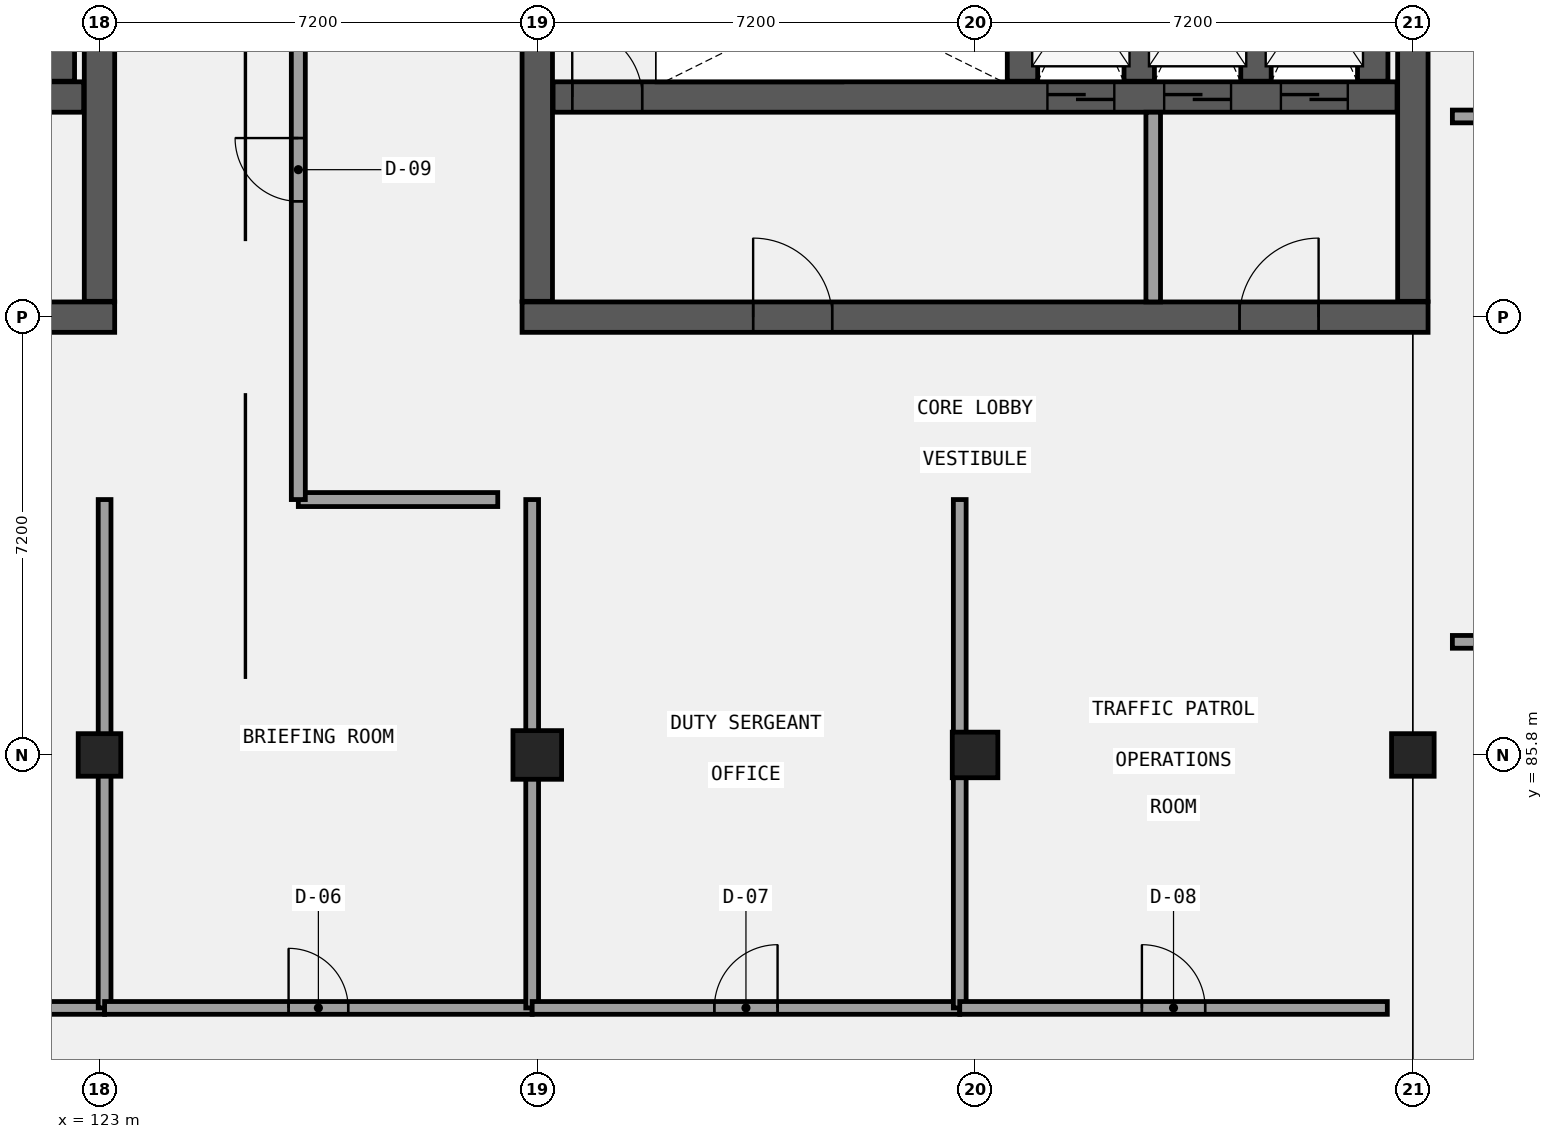
"""IFC4 building model, lengths in metres.
Left out: names, types, materials, properties, quantities, classifications, styles, units other than length and angle.
Written with IfcOpenShell. Run it as: python <this file> out.ifc"""

import sys

from ifc_helpers import new_model, si_unit, direction, frame, frame_2d, origin, origin_2d, place, context, subcontext, project, spatial, rectangle, extrude, element, fill, save


model = new_model("IFC4")
c1 = context("Model", 3, precision=1e-05, world=origin(), true_north=direction((0.0, 1.0)))
c2 = subcontext(c1, "Body", "Model", "MODEL_VIEW")
j1 = project(units=[si_unit("LENGTHUNIT", "METRE"), si_unit("PLANEANGLEUNIT", "RADIAN")], contexts=[c1])
p1 = place(None, origin())
s1 = spatial("IfcSite", under=j1, at=p1, CompositionType="ELEMENT")
p2 = place(p1, origin())
s2 = spatial("IfcBuilding", under=s1, at=p2, CompositionType="ELEMENT")
p3 = place(p2, frame((0.0, 0.0, 5.4)))
s3 = spatial("IfcBuildingStorey", under=s2, at=p3, CompositionType="ELEMENT", Elevation=5.4)
p4 = place(p3, frame((108.35, 93.0, 0.0), z_axis=(0.0, 0.0, 1.0), x_axis=(1.0, 0.0, 0.0)))
e1 = element("IfcWall", 1, at=p4, inside=s3, PredefinedType="SHEAR", context=c2, shape_type="SweptSolid", body=[
    extrude(rectangle(XDim=14.9, YDim=0.5, at=frame_2d((7.45, 0.0))), origin(), (0.0, 0.0, 1.0), 4.2),
])
p5 = place(p4, frame((3.8, 0.0, 0.0)))
e2 = element("IfcOpeningElement", 2, at=p5, cuts=e1, PredefinedType="OPENING", context=c2, shape_type="SweptSolid", body=[
    extrude(rectangle(XDim=1.3, YDim=2.2, at=frame_2d((0.65, 1.1))), frame((0.0, 0.26, 0.0), z_axis=(0.0, -1.0, 0.0), x_axis=(1.0, 0.0, 0.0)), (0.0, 0.0, 1.0), 0.52),
])
p6 = place(p4, frame((11.8, 0.0, 0.0)))
e3 = element("IfcOpeningElement", 3, at=p6, cuts=e1, PredefinedType="OPENING", context=c2, shape_type="SweptSolid", body=[
    extrude(rectangle(XDim=1.3, YDim=2.2, at=frame_2d((0.65, 1.1))), frame((0.0, 0.26, 0.0), z_axis=(0.0, -1.0, 0.0), x_axis=(1.0, 0.0, 0.0)), (0.0, 0.0, 1.0), 0.52),
])
p7 = place(p3, frame((123.0, 93.26, 0.0), z_axis=(0.0, 0.0, 1.0), x_axis=(0.0, 1.0, 0.0)))
e4 = element("IfcWall", 4, at=p7, inside=s3, PredefinedType="SHEAR", context=c2, shape_type="SweptSolid", body=[
    extrude(rectangle(XDim=6.68, YDim=0.5, at=frame_2d((3.34, 0.0))), origin(), (0.0, 0.0, 1.0), 4.2),
])
p8 = place(p3, frame((108.86, 96.62, 0.0), z_axis=(0.0, 0.0, 1.0), x_axis=(1.0, 0.0, 0.0)))
e5 = element("IfcWall", 5, at=p8, inside=s3, PredefinedType="SHEAR", context=c2, shape_type="SweptSolid", body=[
    extrude(rectangle(XDim=13.88, YDim=0.5, at=frame_2d((6.94, 0.0))), origin(), (0.0, 0.0, 1.0), 4.2),
])
p9 = place(p8, frame((8.13, 0.0, 0.0)))
e6 = element("IfcOpeningElement", 6, at=p9, cuts=e5, PredefinedType="OPENING", context=c2, shape_type="SweptSolid", body=[
    extrude(rectangle(XDim=1.1, YDim=2.15, at=frame_2d((0.55, 1.075))), frame((0.0, 0.26, 0.0), z_axis=(0.0, -1.0, 0.0), x_axis=(1.0, 0.0, 0.0)), (0.0, 0.0, 1.0), 0.52),
])
p10 = place(p8, frame((10.05, 0.0, 0.0)))
e7 = element("IfcOpeningElement", 7, at=p10, cuts=e5, PredefinedType="OPENING", context=c2, shape_type="SweptSolid", body=[
    extrude(rectangle(XDim=1.1, YDim=2.15, at=frame_2d((0.55, 1.075))), frame((0.0, 0.26, 0.0), z_axis=(0.0, -1.0, 0.0), x_axis=(1.0, 0.0, 0.0)), (0.0, 0.0, 1.0), 0.52),
])
p11 = place(p8, frame((11.97, 0.0, 0.0)))
e8 = element("IfcOpeningElement", 8, at=p11, cuts=e5, PredefinedType="OPENING", context=c2, shape_type="SweptSolid", body=[
    extrude(rectangle(XDim=1.1, YDim=2.15, at=frame_2d((0.55, 1.075))), frame((0.0, 0.26, 0.0), z_axis=(0.0, -1.0, 0.0), x_axis=(1.0, 0.0, 0.0)), (0.0, 0.0, 1.0), 0.52),
])
p12 = place(p8, frame((0.315, 0.0, 0.0)))
e9 = element("IfcOpeningElement", 9, at=p12, cuts=e5, PredefinedType="OPENING", context=c2, shape_type="SweptSolid", body=[
    extrude(rectangle(XDim=1.15, YDim=2.15, at=frame_2d((0.575, 1.075))), frame((0.0, 0.26, 0.0), z_axis=(0.0, -1.0, 0.0), x_axis=(1.0, 0.0, 0.0)), (0.0, 0.0, 1.0), 0.52),
])
p13 = place(p3, frame((122.34, 96.88, 0.0), z_axis=(0.0, 0.0, 1.0), x_axis=(0.0, 1.0, 0.0)))
e10 = element("IfcWall", 10, at=p13, inside=s3, PredefinedType="SHEAR", context=c2, shape_type="SweptSolid", body=[
    extrude(rectangle(XDim=3.06, YDim=0.5, at=frame_2d((1.53, 0.0))), origin(), (0.0, 0.0, 1.0), 4.2),
])
p14 = place(p3, frame((129.95, 93.0, 0.0), z_axis=(0.0, 0.0, 1.0), x_axis=(1.0, 0.0, 0.0)))
e11 = element("IfcWall", 11, at=p14, inside=s3, PredefinedType="SHEAR", context=c2, shape_type="SweptSolid", body=[
    extrude(rectangle(XDim=14.9, YDim=0.5, at=frame_2d((7.45, 0.0))), origin(), (0.0, 0.0, 1.0), 4.2),
])
p15 = place(p14, frame((3.8, 0.0, 0.0)))
e12 = element("IfcOpeningElement", 12, at=p15, cuts=e11, PredefinedType="OPENING", context=c2, shape_type="SweptSolid", body=[
    extrude(rectangle(XDim=1.3, YDim=2.2, at=frame_2d((0.65, 1.1))), frame((0.0, 0.26, 0.0), z_axis=(0.0, -1.0, 0.0), x_axis=(1.0, 0.0, 0.0)), (0.0, 0.0, 1.0), 0.52),
])
p16 = place(p14, frame((11.8, 0.0, 0.0)))
e13 = element("IfcOpeningElement", 13, at=p16, cuts=e11, PredefinedType="OPENING", context=c2, shape_type="SweptSolid", body=[
    extrude(rectangle(XDim=1.3, YDim=2.2, at=frame_2d((0.65, 1.1))), frame((0.0, 0.26, 0.0), z_axis=(0.0, -1.0, 0.0), x_axis=(1.0, 0.0, 0.0)), (0.0, 0.0, 1.0), 0.52),
])
for number, where, z_axis, x_axis in (
    (14, (130.2, 93.26, 0.0), (0.0, 0.0, 1.0), (0.0, 1.0, 0.0)),
    (15, (144.6, 93.26, 0.0), (0.0, 0.0, 1.0), (0.0, 1.0, 0.0)),
):
    element("IfcWall", number, at=place(p3, frame(where, z_axis=z_axis, x_axis=x_axis)), inside=s3, PredefinedType="SHEAR", context=c2, shape_type="SweptSolid", body=[
        extrude(rectangle(XDim=6.68, YDim=0.5, at=frame_2d((3.34, 0.0))), origin(), (0.0, 0.0, 1.0), 4.2),
    ])
p17 = place(p3, frame((130.46, 96.62, 0.0), z_axis=(0.0, 0.0, 1.0), x_axis=(1.0, 0.0, 0.0)))
e16 = element("IfcWall", 16, at=p17, inside=s3, PredefinedType="SHEAR", context=c2, shape_type="SweptSolid", body=[
    extrude(rectangle(XDim=13.88, YDim=0.5, at=frame_2d((6.94, 0.0))), origin(), (0.0, 0.0, 1.0), 4.2),
])
p18 = place(p17, frame((8.13, 0.0, 0.0)))
e17 = element("IfcOpeningElement", 17, at=p18, cuts=e16, PredefinedType="OPENING", context=c2, shape_type="SweptSolid", body=[
    extrude(rectangle(XDim=1.1, YDim=2.15, at=frame_2d((0.55, 1.075))), frame((0.0, 0.26, 0.0), z_axis=(0.0, -1.0, 0.0), x_axis=(1.0, 0.0, 0.0)), (0.0, 0.0, 1.0), 0.52),
])
p19 = place(p17, frame((10.05, 0.0, 0.0)))
e18 = element("IfcOpeningElement", 18, at=p19, cuts=e16, PredefinedType="OPENING", context=c2, shape_type="SweptSolid", body=[
    extrude(rectangle(XDim=1.1, YDim=2.15, at=frame_2d((0.55, 1.075))), frame((0.0, 0.26, 0.0), z_axis=(0.0, -1.0, 0.0), x_axis=(1.0, 0.0, 0.0)), (0.0, 0.0, 1.0), 0.52),
])
p20 = place(p17, frame((11.97, 0.0, 0.0)))
e19 = element("IfcOpeningElement", 19, at=p20, cuts=e16, PredefinedType="OPENING", context=c2, shape_type="SweptSolid", body=[
    extrude(rectangle(XDim=1.1, YDim=2.15, at=frame_2d((0.55, 1.075))), frame((0.0, 0.26, 0.0), z_axis=(0.0, -1.0, 0.0), x_axis=(1.0, 0.0, 0.0)), (0.0, 0.0, 1.0), 0.52),
])
p21 = place(p17, frame((0.315, 0.0, 0.0)))
e20 = element("IfcOpeningElement", 20, at=p21, cuts=e16, PredefinedType="OPENING", context=c2, shape_type="SweptSolid", body=[
    extrude(rectangle(XDim=1.15, YDim=2.15, at=frame_2d((0.575, 1.075))), frame((0.0, 0.26, 0.0), z_axis=(0.0, -1.0, 0.0), x_axis=(1.0, 0.0, 0.0)), (0.0, 0.0, 1.0), 0.52),
])
for number, where, z_axis, x_axis in (
    (21, (138.18, 96.88, 0.0), (0.0, 0.0, 1.0), (0.0, 1.0, 0.0)),
    (22, (140.1, 96.88, 0.0), (0.0, 0.0, 1.0), (0.0, 1.0, 0.0)),
    (23, (142.02, 96.88, 0.0), (0.0, 0.0, 1.0), (0.0, 1.0, 0.0)),
    (24, (143.94, 96.88, 0.0), (0.0, 0.0, 1.0), (0.0, 1.0, 0.0)),
):
    element("IfcWall", number, at=place(p3, frame(where, z_axis=z_axis, x_axis=x_axis)), inside=s3, PredefinedType="SHEAR", context=c2, shape_type="SweptSolid", body=[
        extrude(rectangle(XDim=3.06, YDim=0.5, at=frame_2d((1.53, 0.0))), origin(), (0.0, 0.0, 1.0), 4.2),
    ])
p22 = place(p3, frame((123.0, 85.8, 0.0), z_axis=(0.0, 0.0, 1.0), x_axis=(1.0, 0.0, 0.0)))
e25 = element("IfcColumn", 25, at=p22, inside=s3, PredefinedType="COLUMN", context=c2, shape_type="SweptSolid", body=[
    extrude(rectangle(XDim=0.7, YDim=0.7, at=origin_2d()), origin(), (0.0, 0.0, 1.0), 4.2),
])
p23 = place(p3, frame((130.2, 85.8, 0.0), z_axis=(0.0, 0.0, 1.0), x_axis=(1.0, 0.0, 0.0)))
e26 = element("IfcColumn", 26, at=p23, inside=s3, PredefinedType="COLUMN", context=c2, shape_type="SweptSolid", body=[
    extrude(rectangle(XDim=0.8, YDim=0.8, at=origin_2d()), origin(), (0.0, 0.0, 1.0), 4.2),
])
p24 = place(p3, frame((137.4, 85.8, 0.0), z_axis=(0.0, 0.0, 1.0), x_axis=(1.0, 0.0, 0.0)))
e27 = element("IfcColumn", 27, at=p24, inside=s3, PredefinedType="COLUMN", context=c2, shape_type="SweptSolid", body=[
    extrude(rectangle(XDim=0.75, YDim=0.75, at=origin_2d()), origin(), (0.0, 0.0, 1.0), 4.2),
])
p25 = place(p3, frame((144.6, 85.8, 0.0), z_axis=(0.0, 0.0, 1.0), x_axis=(1.0, 0.0, 0.0)))
e28 = element("IfcColumn", 28, at=p25, inside=s3, PredefinedType="COLUMN", context=c2, shape_type="SweptSolid", body=[
    extrude(rectangle(XDim=0.7, YDim=0.7, at=origin_2d()), origin(), (0.0, 0.0, 1.0), 4.2),
])
p26 = place(p3, frame((140.33, 93.25, 0.0), z_axis=(0.0, 0.0, 1.0), x_axis=(0.0, 1.0, 0.0)))
e29 = element("IfcWall", 29, at=p26, inside=s3, PredefinedType="SOLIDWALL", context=c2, shape_type="SweptSolid", body=[
    extrude(rectangle(XDim=3.12, YDim=0.24, at=frame_2d((1.56, 0.0))), origin(), (0.0, 0.0, 1.0), 3.89),
])
p27 = place(p3, frame((116.052, 81.64, 0.0), z_axis=(0.0, 0.0, 1.0), x_axis=(1.0, 0.0, 0.0)))
e30 = element("IfcWall", 30, at=p27, inside=s3, PredefinedType="PARTITIONING", context=c2, shape_type="SweptSolid", body=[
    extrude(rectangle(XDim=7.032, YDim=0.21, at=frame_2d((3.516, 0.0))), origin(), (0.0, 0.0, 1.0), 3.92),
])
p28 = place(p27, frame((3.026, 0.0, 0.0)))
e31 = element("IfcOpeningElement", 31, at=p28, cuts=e30, PredefinedType="OPENING", context=c2, shape_type="SweptSolid", body=[
    extrude(rectangle(XDim=0.98, YDim=2.22, at=frame_2d((0.49, 1.11))), frame((0.0, 0.115, 0.0), z_axis=(0.0, -1.0, 0.0), x_axis=(1.0, 0.0, 0.0)), (0.0, 0.0, 1.0), 0.23),
])
p29 = place(p3, frame((123.084, 81.64, 0.0), z_axis=(0.0, 0.0, 1.0), x_axis=(0.0, 1.0, 0.0)))
e32 = element("IfcWall", 32, at=p29, inside=s3, PredefinedType="PARTITIONING", context=c2, shape_type="SweptSolid", body=[
    extrude(rectangle(XDim=8.36, YDim=0.21, at=frame_2d((4.18, 0.0))), origin(), (0.0, 0.0, 1.0), 2.92),
])
p30 = place(p3, frame((123.084, 81.64, 0.0), z_axis=(0.0, 0.0, 1.0), x_axis=(1.0, 0.0, 0.0)))
e33 = element("IfcWall", 33, at=p30, inside=s3, PredefinedType="PARTITIONING", context=c2, shape_type="SweptSolid", body=[
    extrude(rectangle(XDim=7.032, YDim=0.21, at=frame_2d((3.516, 0.0))), origin(), (0.0, 0.0, 1.0), 3.92),
])
p31 = place(p30, frame((3.026, 0.0, 0.0)))
e34 = element("IfcOpeningElement", 34, at=p31, cuts=e33, PredefinedType="OPENING", context=c2, shape_type="SweptSolid", body=[
    extrude(rectangle(XDim=0.98, YDim=2.35, at=frame_2d((0.49, 1.175))), frame((0.0, 0.115, 0.0), z_axis=(0.0, -1.0, 0.0), x_axis=(1.0, 0.0, 0.0)), (0.0, 0.0, 1.0), 0.23),
])
p32 = place(p3, frame((130.116, 81.64, 0.0), z_axis=(0.0, 0.0, 1.0), x_axis=(0.0, 1.0, 0.0)))
e35 = element("IfcWall", 35, at=p32, inside=s3, PredefinedType="PARTITIONING", context=c2, shape_type="SweptSolid", body=[
    extrude(rectangle(XDim=8.36, YDim=0.21, at=frame_2d((4.18, 0.0))), origin(), (0.0, 0.0, 1.0), 2.92),
])
p33 = place(p3, frame((130.116, 81.64, 0.0), z_axis=(0.0, 0.0, 1.0), x_axis=(1.0, 0.0, 0.0)))
e36 = element("IfcWall", 36, at=p33, inside=s3, PredefinedType="PARTITIONING", context=c2, shape_type="SweptSolid", body=[
    extrude(rectangle(XDim=7.032, YDim=0.21, at=frame_2d((3.516, 0.0))), origin(), (0.0, 0.0, 1.0), 3.92),
])
p34 = place(p33, frame((2.996, 0.0, 0.0)))
e37 = element("IfcOpeningElement", 37, at=p34, cuts=e36, PredefinedType="OPENING", context=c2, shape_type="SweptSolid", body=[
    extrude(rectangle(XDim=1.04, YDim=2.1, at=frame_2d((0.52, 1.05))), frame((0.0, 0.115, 0.0), z_axis=(0.0, -1.0, 0.0), x_axis=(1.0, 0.0, 0.0)), (0.0, 0.0, 1.0), 0.23),
])
p35 = place(p3, frame((137.148, 81.64, 0.0), z_axis=(0.0, 0.0, 1.0), x_axis=(0.0, 1.0, 0.0)))
e38 = element("IfcWall", 38, at=p35, inside=s3, PredefinedType="PARTITIONING", context=c2, shape_type="SweptSolid", body=[
    extrude(rectangle(XDim=8.36, YDim=0.21, at=frame_2d((4.18, 0.0))), origin(), (0.0, 0.0, 1.0), 3.32),
])
p36 = place(p3, frame((137.148, 81.64, 0.0), z_axis=(0.0, 0.0, 1.0), x_axis=(1.0, 0.0, 0.0)))
e39 = element("IfcWall", 39, at=p36, inside=s3, PredefinedType="PARTITIONING", context=c2, shape_type="SweptSolid", body=[
    extrude(rectangle(XDim=7.032, YDim=0.21, at=frame_2d((3.516, 0.0))), origin(), (0.0, 0.0, 1.0), 3.92),
])
p37 = place(p36, frame((2.996, 0.0, 0.0)))
e40 = element("IfcOpeningElement", 40, at=p37, cuts=e39, PredefinedType="OPENING", context=c2, shape_type="SweptSolid", body=[
    extrude(rectangle(XDim=1.04, YDim=2.22, at=frame_2d((0.52, 1.11))), frame((0.0, 0.115, 0.0), z_axis=(0.0, -1.0, 0.0), x_axis=(1.0, 0.0, 0.0)), (0.0, 0.0, 1.0), 0.23),
])
p38 = place(p3, frame((126.27, 90.0, 0.0), z_axis=(0.0, 0.0, 1.0), x_axis=(1.0, 0.0, 0.0)))
e41 = element("IfcWall", 41, at=p38, inside=s3, PredefinedType="PARTITIONING", context=c2, shape_type="SweptSolid", body=[
    extrude(rectangle(XDim=3.28, YDim=0.23, at=frame_2d((1.64, 0.0))), origin(), (0.0, 0.0, 1.0), 3.92),
])
p39 = place(p3, frame((126.27, 90.0, 0.0), z_axis=(0.0, 0.0, 1.0), x_axis=(0.0, 1.0, 0.0)))
e42 = element("IfcWall", 42, at=p39, inside=s3, PredefinedType="PARTITIONING", context=c2, shape_type="SweptSolid", body=[
    extrude(rectangle(XDim=10.85, YDim=0.23, at=frame_2d((5.425, 0.0))), origin(), (0.0, 0.0, 1.0), 3.92),
])
p40 = place(p39, frame((4.905, 0.0, 0.0)))
e43 = element("IfcOpeningElement", 43, at=p40, cuts=e42, PredefinedType="OPENING", context=c2, shape_type="SweptSolid", body=[
    extrude(rectangle(XDim=1.04, YDim=2.35, at=frame_2d((0.52, 1.175))), frame((0.0, 0.125, 0.0), z_axis=(0.0, -1.0, 0.0), x_axis=(1.0, 0.0, 0.0)), (0.0, 0.0, 1.0), 0.25),
])
p41 = place(p3, frame((145.25, 87.66, 0.0), z_axis=(0.0, 0.0, 1.0), x_axis=(1.0, 0.0, 0.0)))
e44 = element("IfcWall", 44, at=p41, inside=s3, PredefinedType="PARTITIONING", context=c2, shape_type="SweptSolid", body=[
    extrude(rectangle(XDim=9.645, YDim=0.21, at=frame_2d((4.823, 0.0))), origin(), (0.0, 0.0, 1.0), 3.37),
])
p42 = place(p3, frame((145.25, 96.3, 0.0), z_axis=(0.0, 0.0, 1.0), x_axis=(1.0, 0.0, 0.0)))
e45 = element("IfcWall", 45, at=p42, inside=s3, PredefinedType="PARTITIONING", context=c2, shape_type="SweptSolid", body=[
    extrude(rectangle(XDim=9.645, YDim=0.21, at=frame_2d((4.823, 0.0))), origin(), (0.0, 0.0, 1.0), 3.92),
])
p43 = place(p18, frame((1.1, 0.0, 0.0), z_axis=(0.0, 0.0, 1.0), x_axis=(-1.0, 0.0, 0.0)))
e46 = element("IfcDoor", 46, at=p43, inside=s3, OperationType="DOUBLE_DOOR_SLIDING", PredefinedType="DOOR", context=c2, shape_type="SweptSolid", body=[
    extrude(rectangle(XDim=1.1, YDim=2.15, at=frame_2d((0.55, 1.075))), frame((0.0, 0.025, 0.0), z_axis=(0.0, -1.0, 0.0), x_axis=(1.0, 0.0, 0.0)), (0.0, 0.0, 1.0), 0.05),
])
fill(e17, e46)
p44 = place(p19, frame((1.1, 0.0, 0.0), z_axis=(0.0, 0.0, 1.0), x_axis=(-1.0, 0.0, 0.0)))
e47 = element("IfcDoor", 47, at=p44, inside=s3, OperationType="DOUBLE_DOOR_SLIDING", PredefinedType="DOOR", context=c2, shape_type="SweptSolid", body=[
    extrude(rectangle(XDim=1.1, YDim=2.15, at=frame_2d((0.55, 1.075))), frame((0.0, 0.025, 0.0), z_axis=(0.0, -1.0, 0.0), x_axis=(1.0, 0.0, 0.0)), (0.0, 0.0, 1.0), 0.05),
])
fill(e18, e47)
p45 = place(p20, frame((1.1, 0.0, 0.0), z_axis=(0.0, 0.0, 1.0), x_axis=(-1.0, 0.0, 0.0)))
e48 = element("IfcDoor", 48, at=p45, inside=s3, OperationType="DOUBLE_DOOR_SLIDING", PredefinedType="DOOR", context=c2, shape_type="SweptSolid", body=[
    extrude(rectangle(XDim=1.1, YDim=2.15, at=frame_2d((0.55, 1.075))), frame((0.0, 0.025, 0.0), z_axis=(0.0, -1.0, 0.0), x_axis=(1.0, 0.0, 0.0)), (0.0, 0.0, 1.0), 0.05),
])
fill(e19, e48)
p46 = place(p21, origin())
e49 = element("IfcDoor", 49, at=p46, inside=s3, OperationType="SINGLE_SWING_LEFT", PredefinedType="DOOR", context=c2, shape_type="SweptSolid", body=[
    extrude(rectangle(XDim=1.15, YDim=2.15, at=frame_2d((0.575, 1.075))), frame((0.0, 0.025, 0.0), z_axis=(0.0, -1.0, 0.0), x_axis=(1.0, 0.0, 0.0)), (0.0, 0.0, 1.0), 0.05),
])
fill(e20, e49)
p47 = place(p15, frame((1.3, 0.0, 0.0), z_axis=(0.0, 0.0, 1.0), x_axis=(-1.0, 0.0, 0.0)))
e50 = element("IfcDoor", 50, at=p47, inside=s3, OperationType="SINGLE_SWING_LEFT", PredefinedType="DOOR", context=c2, shape_type="SweptSolid", body=[
    extrude(rectangle(XDim=1.3, YDim=2.2, at=frame_2d((0.65, 1.1))), frame((0.0, 0.025, 0.0), z_axis=(0.0, -1.0, 0.0), x_axis=(1.0, 0.0, 0.0)), (0.0, 0.0, 1.0), 0.05),
])
fill(e12, e50)
p48 = place(p16, frame((1.3, 0.0, 0.0), z_axis=(0.0, 0.0, 1.0), x_axis=(-1.0, 0.0, 0.0)))
e51 = element("IfcDoor", 51, at=p48, inside=s3, OperationType="SINGLE_SWING_RIGHT", PredefinedType="DOOR", context=c2, shape_type="SweptSolid", body=[
    extrude(rectangle(XDim=1.3, YDim=2.2, at=frame_2d((0.65, 1.1))), frame((0.0, 0.025, 0.0), z_axis=(0.0, -1.0, 0.0), x_axis=(1.0, 0.0, 0.0)), (0.0, 0.0, 1.0), 0.05),
])
fill(e13, e51)
p49 = place(p31, origin())
e52 = element("IfcDoor", 52, at=p49, inside=s3, OperationType="SINGLE_SWING_LEFT", PredefinedType="DOOR", context=c2, shape_type="SweptSolid", body=[
    extrude(rectangle(XDim=0.98, YDim=2.35, at=frame_2d((0.49, 1.175))), frame((0.0, 0.025, 0.0), z_axis=(0.0, -1.0, 0.0), x_axis=(1.0, 0.0, 0.0)), (0.0, 0.0, 1.0), 0.05),
])
fill(e34, e52)
p50 = place(p34, origin())
e53 = element("IfcDoor", 53, at=p50, inside=s3, OperationType="SINGLE_SWING_RIGHT", PredefinedType="DOOR", context=c2, shape_type="SweptSolid", body=[
    extrude(rectangle(XDim=1.04, YDim=2.1, at=frame_2d((0.52, 1.05))), frame((0.0, 0.025, 0.0), z_axis=(0.0, -1.0, 0.0), x_axis=(1.0, 0.0, 0.0)), (0.0, 0.0, 1.0), 0.05),
])
fill(e37, e53)
p51 = place(p37, origin())
e54 = element("IfcDoor", 54, at=p51, inside=s3, OperationType="SINGLE_SWING_LEFT", PredefinedType="DOOR", context=c2, shape_type="SweptSolid", body=[
    extrude(rectangle(XDim=1.04, YDim=2.22, at=frame_2d((0.52, 1.11))), frame((0.0, 0.025, 0.0), z_axis=(0.0, -1.0, 0.0), x_axis=(1.0, 0.0, 0.0)), (0.0, 0.0, 1.0), 0.05),
])
fill(e40, e54)
p52 = place(p40, origin())
e55 = element("IfcDoor", 55, at=p52, inside=s3, OperationType="SINGLE_SWING_RIGHT", PredefinedType="DOOR", context=c2, shape_type="SweptSolid", body=[
    extrude(rectangle(XDim=1.04, YDim=2.35, at=frame_2d((0.52, 1.175))), frame((0.0, 0.025, 0.0), z_axis=(0.0, -1.0, 0.0), x_axis=(1.0, 0.0, 0.0)), (0.0, 0.0, 1.0), 0.05),
])
fill(e43, e55)
save(model, sys.argv[1])
